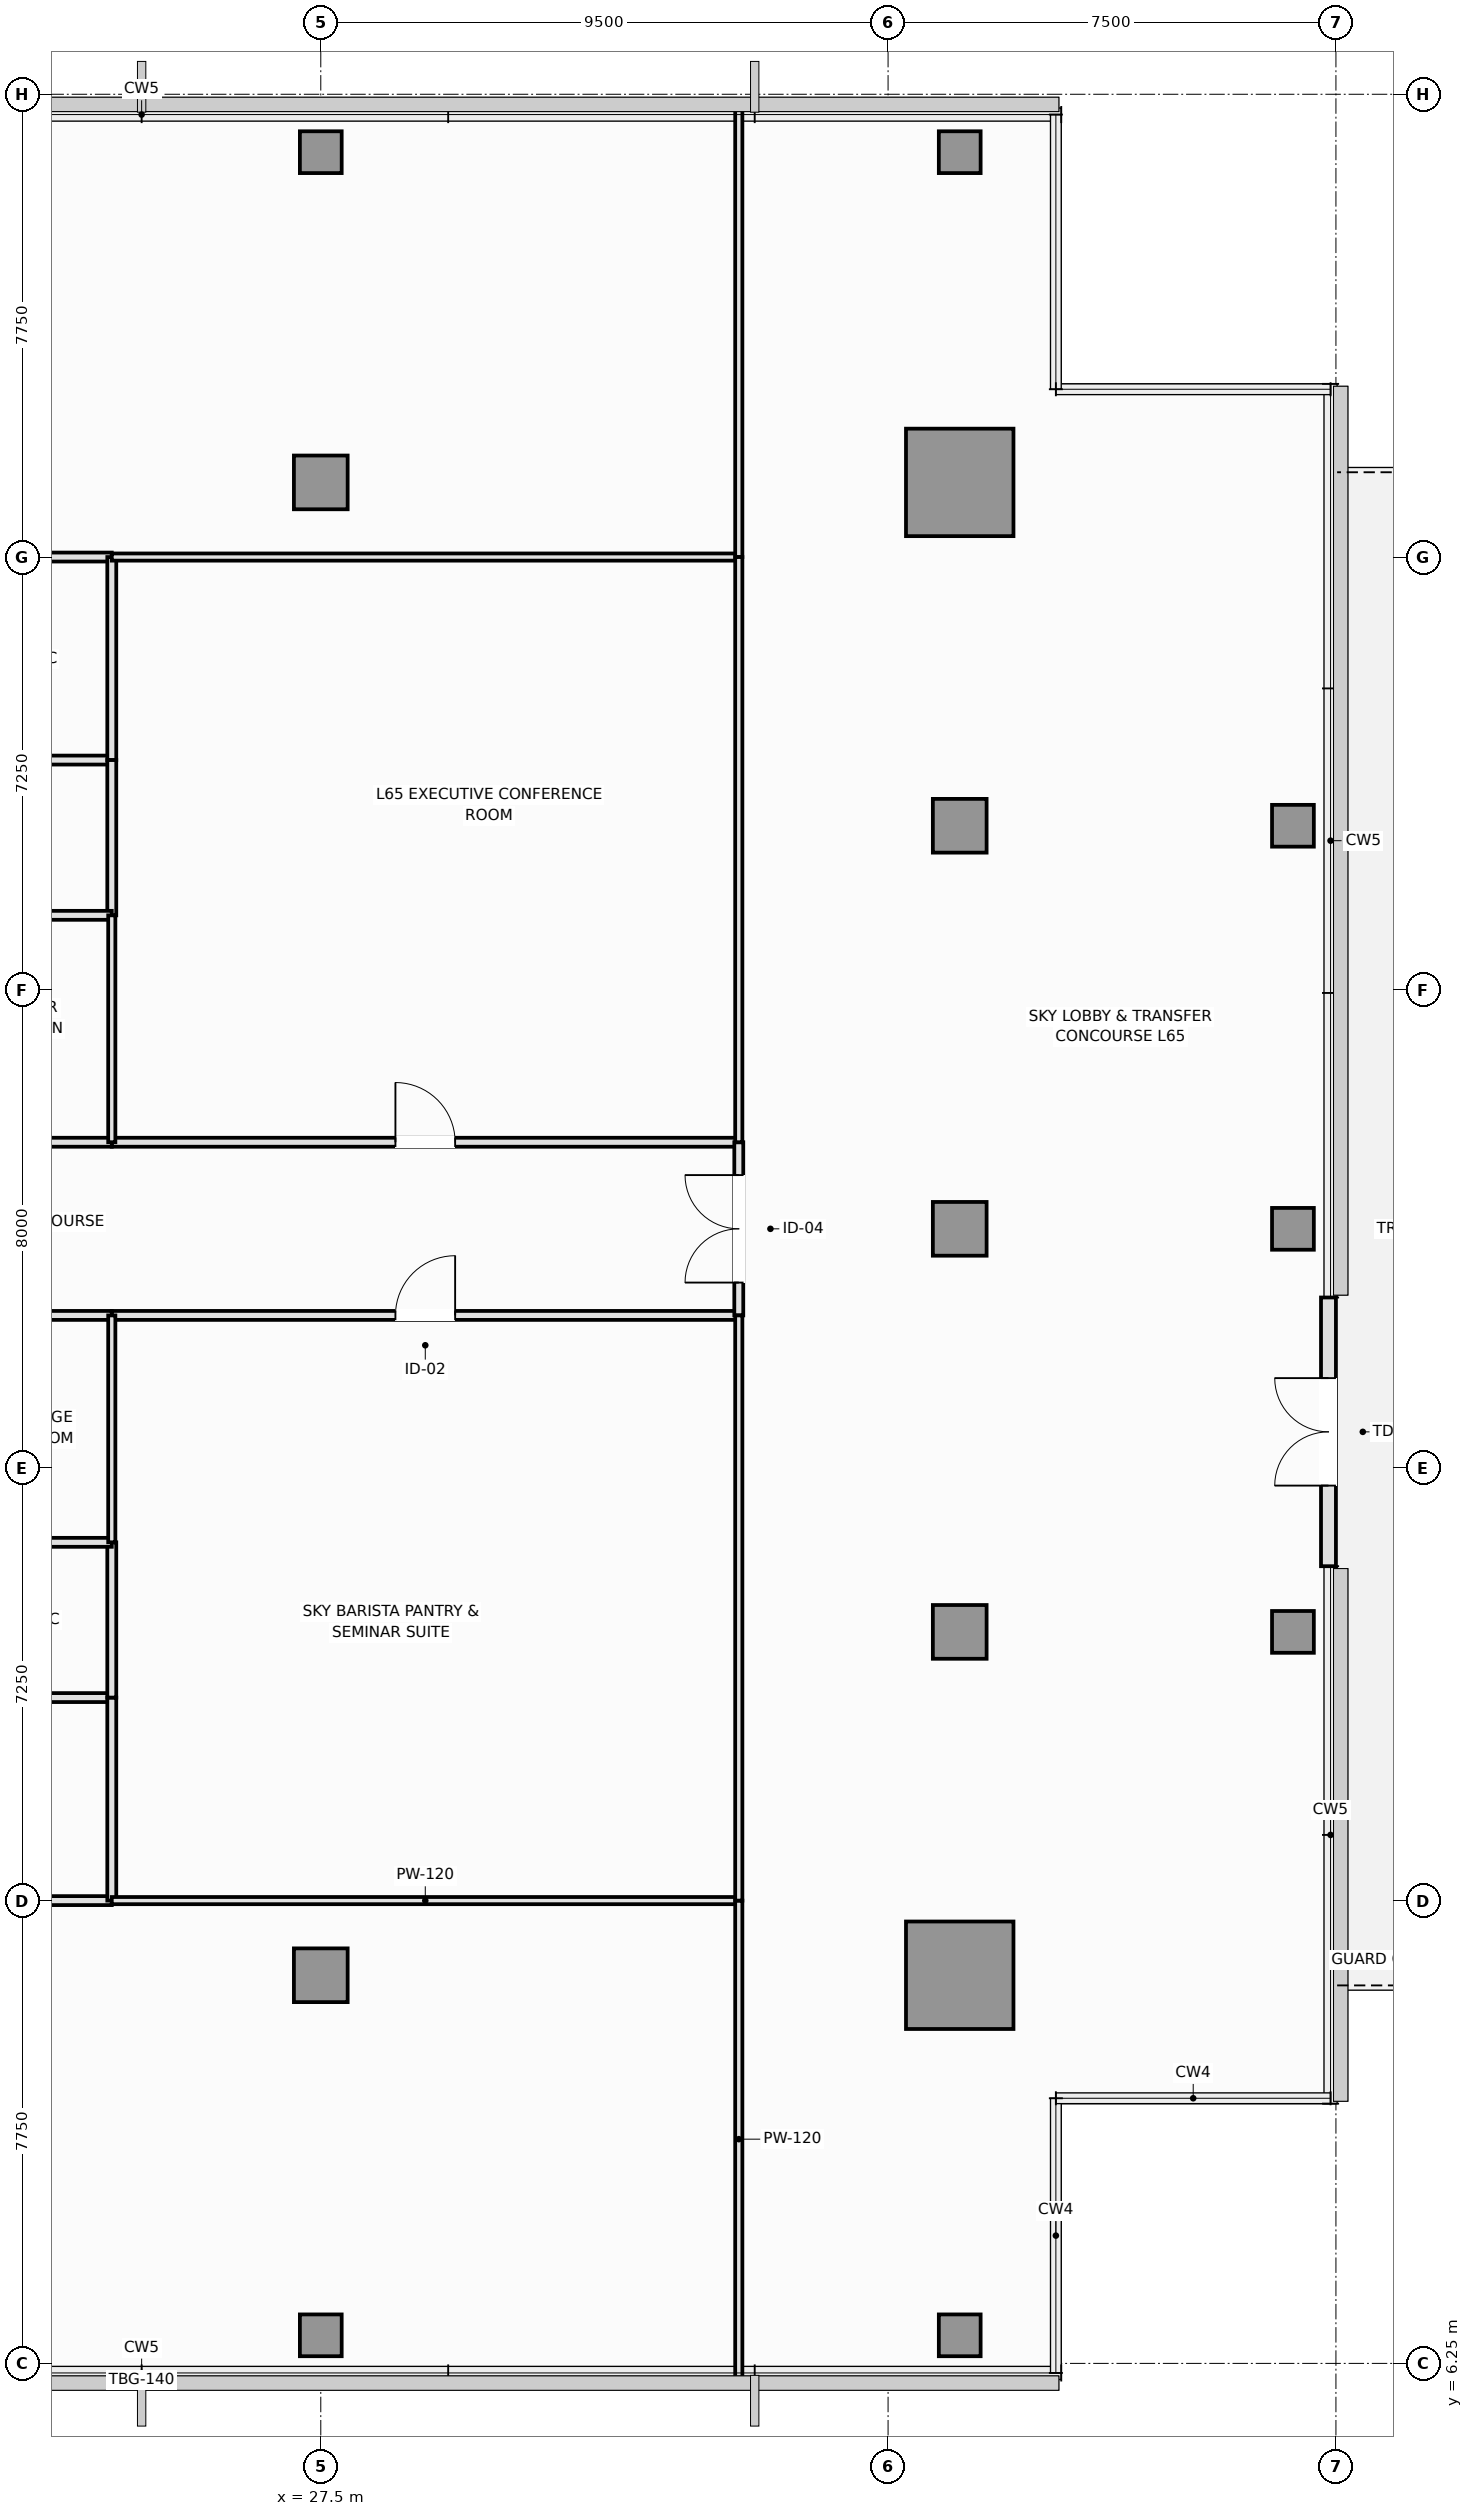
"""IFC4 building model, lengths in metres.
Left out: names, types, materials, properties, quantities, classifications, styles, units other than length and angle.
Written with IfcOpenShell. Run it as: python <this file> out.ifc"""

import sys

from ifc_helpers import new_model, si_unit, direction, frame, frame_2d, origin, origin_2d, place, context, subcontext, project, spatial, rectangle, extrude, element, fill, save


model = new_model("IFC4")
c1 = context("Model", 3, precision=1e-05, world=origin(), true_north=direction((0.0, 1.0)))
c2 = subcontext(c1, "Body", "Model", "MODEL_VIEW")
j1 = project(units=[si_unit("LENGTHUNIT", "METRE"), si_unit("PLANEANGLEUNIT", "RADIAN")], contexts=[c1])
p1 = place(None, origin())
s1 = spatial("IfcSite", under=j1, at=p1, CompositionType="ELEMENT")
p2 = place(p1, origin())
s2 = spatial("IfcBuilding", under=s1, at=p2, CompositionType="ELEMENT")
p3 = place(p2, frame((0.0, 0.0, 244.85)))
s3 = spatial("IfcBuildingStorey", under=s2, at=p3, CompositionType="ELEMENT", Elevation=244.85)
for number, where, z_axis, x_axis in (
    (1, (38.2, 12.75, 0.0), (0.0, 0.0, 1.0), (1.0, 0.0, 0.0)),
    (2, (38.2, 37.75, 0.0), (0.0, 0.0, 1.0), (1.0, 0.0, 0.0)),
):
    element("IfcColumn", number, at=place(p3, frame(where, z_axis=z_axis, x_axis=x_axis)), inside=s3, PredefinedType="COLUMN", context=c2, shape_type="SweptSolid", body=[
        extrude(rectangle(XDim=1.8, YDim=1.8, at=origin_2d()), origin(), (0.0, 0.0, 1.0), 4.4),
    ])
for number, where, z_axis, x_axis in (
    (3, (27.5, 12.75, 0.0), (0.0, 0.0, 1.0), (1.0, 0.0, 0.0)),
    (4, (27.5, 37.75, 0.0), (0.0, 0.0, 1.0), (1.0, 0.0, 0.0)),
    (5, (38.2, 18.5, 0.0), (0.0, 0.0, 1.0), (1.0, 0.0, 0.0)),
    (6, (38.2, 25.25, 0.0), (0.0, 0.0, 1.0), (1.0, 0.0, 0.0)),
    (7, (38.2, 32.0, 0.0), (0.0, 0.0, 1.0), (1.0, 0.0, 0.0)),
):
    element("IfcColumn", number, at=place(p3, frame(where, z_axis=z_axis, x_axis=x_axis)), inside=s3, PredefinedType="COLUMN", context=c2, shape_type="SweptSolid", body=[
        extrude(rectangle(XDim=0.9, YDim=0.9, at=origin_2d()), origin(), (0.0, 0.0, 1.0), 4.4),
    ])
for number, where, z_axis, x_axis in (
    (8, (43.78, 18.5, 0.0), (0.0, 0.0, 1.0), (1.0, 0.0, 0.0)),
    (9, (43.78, 25.25, 0.0), (0.0, 0.0, 1.0), (1.0, 0.0, 0.0)),
    (10, (43.78, 32.0, 0.0), (0.0, 0.0, 1.0), (1.0, 0.0, 0.0)),
    (11, (27.5, 6.72, 0.0), (0.0, 0.0, 1.0), (1.0, 0.0, 0.0)),
    (12, (38.2, 6.72, 0.0), (0.0, 0.0, 1.0), (1.0, 0.0, 0.0)),
    (13, (27.5, 43.28, 0.0), (0.0, 0.0, 1.0), (1.0, 0.0, 0.0)),
    (14, (38.2, 43.28, 0.0), (0.0, 0.0, 1.0), (1.0, 0.0, 0.0)),
):
    element("IfcColumn", number, at=place(p3, frame(where, z_axis=z_axis, x_axis=x_axis)), inside=s3, PredefinedType="COLUMN", context=c2, shape_type="SweptSolid", body=[
        extrude(rectangle(XDim=0.7, YDim=0.7, at=origin_2d()), origin(), (0.0, 0.0, 1.0), 4.4),
    ])
p4 = place(p3, frame((44.375, 19.6, 0.0), z_axis=(0.0, 0.0, 1.0), x_axis=(0.0, 1.0, 0.0)))
e15 = element("IfcWall", 15, at=p4, inside=s3, PredefinedType="SOLIDWALL", context=c2, shape_type="SweptSolid", body=[
    extrude(rectangle(XDim=4.5, YDim=0.25, at=frame_2d((2.25, 0.0))), origin(), (0.0, 0.0, 1.0), 4.24),
])
p5 = place(p4, frame((1.35, 0.0, 0.0)))
e16 = element("IfcOpeningElement", 16, at=p5, cuts=e15, PredefinedType="OPENING", context=c2, shape_type="SweptSolid", body=[
    extrude(rectangle(XDim=1.8, YDim=2.2, at=frame_2d((0.9, 1.1))), frame((0.0, 0.135, 0.0), z_axis=(0.0, -1.0, 0.0), x_axis=(1.0, 0.0, 0.0)), (0.0, 0.0, 1.0), 0.27),
])
p6 = place(p3, frame((24.0, 23.8, 0.0), z_axis=(0.0, 0.0, 1.0), x_axis=(1.0, 0.0, 0.0)))
e17 = element("IfcWall", 17, at=p6, inside=s3, PredefinedType="PARTITIONING", context=c2, shape_type="SweptSolid", body=[
    extrude(rectangle(XDim=10.5, YDim=0.15, at=frame_2d((5.25, 0.0))), origin(), (0.0, 0.0, 1.0), 4.24),
])
p7 = place(p6, frame((4.75, 0.0, 0.0)))
e18 = element("IfcOpeningElement", 18, at=p7, cuts=e17, PredefinedType="OPENING", context=c2, shape_type="SweptSolid", body=[
    extrude(rectangle(XDim=1.0, YDim=2.15, at=frame_2d((0.5, 1.075))), frame((0.0, 0.085, 0.0), z_axis=(0.0, -1.0, 0.0), x_axis=(1.0, 0.0, 0.0)), (0.0, 0.0, 1.0), 0.17),
])
p8 = place(p3, frame((24.0, 26.7, 0.0), z_axis=(0.0, 0.0, 1.0), x_axis=(1.0, 0.0, 0.0)))
e19 = element("IfcWall", 19, at=p8, inside=s3, PredefinedType="PARTITIONING", context=c2, shape_type="SweptSolid", body=[
    extrude(rectangle(XDim=10.5, YDim=0.15, at=frame_2d((5.25, 0.0))), origin(), (0.0, 0.0, 1.0), 4.24),
])
p9 = place(p8, frame((4.75, 0.0, 0.0)))
e20 = element("IfcOpeningElement", 20, at=p9, cuts=e19, PredefinedType="OPENING", context=c2, shape_type="SweptSolid", body=[
    extrude(rectangle(XDim=1.0, YDim=2.15, at=frame_2d((0.5, 1.075))), frame((0.0, 0.085, 0.0), z_axis=(0.0, -1.0, 0.0), x_axis=(1.0, 0.0, 0.0)), (0.0, 0.0, 1.0), 0.17),
])
p10 = place(p3, frame((34.5, 23.8, 0.0), z_axis=(0.0, 0.0, 1.0), x_axis=(0.0, 1.0, 0.0)))
e21 = element("IfcWall", 21, at=p10, inside=s3, PredefinedType="PARTITIONING", context=c2, shape_type="SweptSolid", body=[
    extrude(rectangle(XDim=2.9, YDim=0.15, at=frame_2d((1.45, 0.0))), origin(), (0.0, 0.0, 1.0), 4.24),
])
p11 = place(p10, frame((0.55, 0.0, 0.0)))
e22 = element("IfcOpeningElement", 22, at=p11, cuts=e21, PredefinedType="OPENING", context=c2, shape_type="SweptSolid", body=[
    extrude(rectangle(XDim=1.8, YDim=2.2, at=frame_2d((0.9, 1.1))), frame((0.0, 0.085, 0.0), z_axis=(0.0, -1.0, 0.0), x_axis=(1.0, 0.0, 0.0)), (0.0, 0.0, 1.0), 0.17),
])
for number, where, z_axis, x_axis in (
    (23, (20.2, 23.8, 0.0), (0.0, 0.0, 1.0), (1.0, 0.0, 0.0)),
    (24, (20.2, 26.7, 0.0), (0.0, 0.0, 1.0), (1.0, 0.0, 0.0)),
):
    element("IfcWall", number, at=place(p3, frame(where, z_axis=z_axis, x_axis=x_axis)), inside=s3, PredefinedType="PARTITIONING", context=c2, shape_type="SweptSolid", body=[
        extrude(rectangle(XDim=3.8, YDim=0.15, at=frame_2d((1.9, 0.0))), origin(), (0.0, 0.0, 1.0), 4.24),
    ])
for number, where, z_axis, x_axis in (
    (25, (20.2, 17.4, 0.0), (0.0, 0.0, 1.0), (1.0, 0.0, 0.0)),
    (26, (20.2, 14.0, 0.0), (0.0, 0.0, 1.0), (1.0, 0.0, 0.0)),
):
    element("IfcWall", number, at=place(p3, frame(where, z_axis=z_axis, x_axis=x_axis)), inside=s3, PredefinedType="PLUMBINGWALL", context=c2, shape_type="SweptSolid", body=[
        extrude(rectangle(XDim=3.8, YDim=0.15, at=frame_2d((1.9, 0.0))), origin(), (0.0, 0.0, 1.0), 4.24),
    ])
p12 = place(p3, frame((24.0, 14.0, 0.0), z_axis=(0.0, 0.0, 1.0), x_axis=(0.0, 1.0, 0.0)))
e27 = element("IfcWall", 27, at=p12, inside=s3, PredefinedType="PLUMBINGWALL", context=c2, shape_type="SweptSolid", body=[
    extrude(rectangle(XDim=3.4, YDim=0.15, at=frame_2d((1.7, 0.0))), origin(), (0.0, 0.0, 1.0), 4.24),
])
for number, where, z_axis, x_axis in (
    (28, (20.2, 33.1, 0.0), (0.0, 0.0, 1.0), (1.0, 0.0, 0.0)),
    (29, (20.2, 36.5, 0.0), (0.0, 0.0, 1.0), (1.0, 0.0, 0.0)),
):
    element("IfcWall", number, at=place(p3, frame(where, z_axis=z_axis, x_axis=x_axis)), inside=s3, PredefinedType="PLUMBINGWALL", context=c2, shape_type="SweptSolid", body=[
        extrude(rectangle(XDim=3.8, YDim=0.15, at=frame_2d((1.9, 0.0))), origin(), (0.0, 0.0, 1.0), 4.24),
    ])
p13 = place(p3, frame((24.0, 33.1, 0.0), z_axis=(0.0, 0.0, 1.0), x_axis=(0.0, 1.0, 0.0)))
e30 = element("IfcWall", 30, at=p13, inside=s3, PredefinedType="PLUMBINGWALL", context=c2, shape_type="SweptSolid", body=[
    extrude(rectangle(XDim=3.4, YDim=0.15, at=frame_2d((1.7, 0.0))), origin(), (0.0, 0.0, 1.0), 4.24),
])
p14 = place(p3, frame((24.0, 17.4, 0.0), z_axis=(0.0, 0.0, 1.0), x_axis=(0.0, 1.0, 0.0)))
e31 = element("IfcWall", 31, at=p14, inside=s3, PredefinedType="PLUMBINGWALL", context=c2, shape_type="SweptSolid", body=[
    extrude(rectangle(XDim=2.6, YDim=0.15, at=frame_2d((1.3, 0.0))), origin(), (0.0, 0.0, 1.0), 4.24),
])
p15 = place(p3, frame((20.2, 20.0, 0.0), z_axis=(0.0, 0.0, 1.0), x_axis=(1.0, 0.0, 0.0)))
e32 = element("IfcWall", 32, at=p15, inside=s3, PredefinedType="PLUMBINGWALL", context=c2, shape_type="SweptSolid", body=[
    extrude(rectangle(XDim=3.8, YDim=0.15, at=frame_2d((1.9, 0.0))), origin(), (0.0, 0.0, 1.0), 4.24),
])
p16 = place(p3, frame((24.0, 30.5, 0.0), z_axis=(0.0, 0.0, 1.0), x_axis=(0.0, 1.0, 0.0)))
e33 = element("IfcWall", 33, at=p16, inside=s3, PredefinedType="PLUMBINGWALL", context=c2, shape_type="SweptSolid", body=[
    extrude(rectangle(XDim=2.6, YDim=0.15, at=frame_2d((1.3, 0.0))), origin(), (0.0, 0.0, 1.0), 4.24),
])
p17 = place(p3, frame((20.2, 30.5, 0.0), z_axis=(0.0, 0.0, 1.0), x_axis=(1.0, 0.0, 0.0)))
e34 = element("IfcWall", 34, at=p17, inside=s3, PredefinedType="PLUMBINGWALL", context=c2, shape_type="SweptSolid", body=[
    extrude(rectangle(XDim=3.8, YDim=0.15, at=frame_2d((1.9, 0.0))), origin(), (0.0, 0.0, 1.0), 4.24),
])
p18 = place(p3, frame((24.0, 14.0, 0.0), z_axis=(0.0, 0.0, 1.0), x_axis=(1.0, 0.0, 0.0)))
e35 = element("IfcWall", 35, at=p18, inside=s3, PredefinedType="PARTITIONING", context=c2, shape_type="SweptSolid", body=[
    extrude(rectangle(XDim=10.5, YDim=0.12, at=frame_2d((5.25, 0.0))), origin(), (0.0, 0.0, 1.0), 4.24),
])
p19 = place(p3, frame((34.5, 6.01, 0.0), z_axis=(0.0, 0.0, 1.0), x_axis=(0.0, 1.0, 0.0)))
e36 = element("IfcWall", 36, at=p19, inside=s3, PredefinedType="PARTITIONING", context=c2, shape_type="SweptSolid", body=[
    extrude(rectangle(XDim=7.99, YDim=0.12, at=frame_2d((3.995, 0.0))), origin(), (0.0, 0.0, 1.0), 3.91),
])
p20 = place(p3, frame((24.0, 36.5, 0.0), z_axis=(0.0, 0.0, 1.0), x_axis=(1.0, 0.0, 0.0)))
e37 = element("IfcWall", 37, at=p20, inside=s3, PredefinedType="PARTITIONING", context=c2, shape_type="SweptSolid", body=[
    extrude(rectangle(XDim=10.5, YDim=0.12, at=frame_2d((5.25, 0.0))), origin(), (0.0, 0.0, 1.0), 4.24),
])
p21 = place(p3, frame((34.5, 36.5, 0.0), z_axis=(0.0, 0.0, 1.0), x_axis=(0.0, 1.0, 0.0)))
e38 = element("IfcWall", 38, at=p21, inside=s3, PredefinedType="PARTITIONING", context=c2, shape_type="SweptSolid", body=[
    extrude(rectangle(XDim=7.49, YDim=0.12, at=frame_2d((3.745, 0.0))), origin(), (0.0, 0.0, 1.0), 3.91),
])
p22 = place(p3, frame((34.5, 14.0, 0.0), z_axis=(0.0, 0.0, 1.0), x_axis=(0.0, 1.0, 0.0)))
e39 = element("IfcWall", 39, at=p22, inside=s3, PredefinedType="PARTITIONING", context=c2, shape_type="SweptSolid", body=[
    extrude(rectangle(XDim=9.8, YDim=0.12, at=frame_2d((4.9, 0.0))), origin(), (0.0, 0.0, 1.0), 4.24),
])
p23 = place(p3, frame((24.0, 20.0, 0.0), z_axis=(0.0, 0.0, 1.0), x_axis=(0.0, 1.0, 0.0)))
e40 = element("IfcWall", 40, at=p23, inside=s3, PredefinedType="PARTITIONING", context=c2, shape_type="SweptSolid", body=[
    extrude(rectangle(XDim=3.8, YDim=0.12, at=frame_2d((1.9, 0.0))), origin(), (0.0, 0.0, 1.0), 4.24),
])
p24 = place(p3, frame((34.5, 26.7, 0.0), z_axis=(0.0, 0.0, 1.0), x_axis=(0.0, 1.0, 0.0)))
e41 = element("IfcWall", 41, at=p24, inside=s3, PredefinedType="PARTITIONING", context=c2, shape_type="SweptSolid", body=[
    extrude(rectangle(XDim=9.8, YDim=0.12, at=frame_2d((4.9, 0.0))), origin(), (0.0, 0.0, 1.0), 4.24),
])
p25 = place(p3, frame((24.0, 26.7, 0.0), z_axis=(0.0, 0.0, 1.0), x_axis=(0.0, 1.0, 0.0)))
e42 = element("IfcWall", 42, at=p25, inside=s3, PredefinedType="PARTITIONING", context=c2, shape_type="SweptSolid", body=[
    extrude(rectangle(XDim=3.8, YDim=0.12, at=frame_2d((1.9, 0.0))), origin(), (0.0, 0.0, 1.0), 4.24),
])
p26 = place(p5, frame((1.8, 0.0, 0.0), z_axis=(0.0, 0.0, 1.0), x_axis=(-1.0, 0.0, 0.0)))
e43 = element("IfcDoor", 43, at=p26, inside=s3, OperationType="DOUBLE_DOOR_SINGLE_SWING", PredefinedType="DOOR", context=c2, shape_type="SweptSolid", body=[
    extrude(rectangle(XDim=1.8, YDim=2.2, at=frame_2d((0.9, 1.1))), frame((0.0, 0.025, 0.0), z_axis=(0.0, -1.0, 0.0), x_axis=(1.0, 0.0, 0.0)), (0.0, 0.0, 1.0), 0.05),
])
fill(e16, e43)
p27 = place(p7, origin())
e44 = element("IfcDoor", 44, at=p27, inside=s3, OperationType="SINGLE_SWING_RIGHT", PredefinedType="DOOR", context=c2, shape_type="SweptSolid", body=[
    extrude(rectangle(XDim=1.0, YDim=2.15, at=frame_2d((0.5, 1.075))), frame((0.0, 0.025, 0.0), z_axis=(0.0, -1.0, 0.0), x_axis=(1.0, 0.0, 0.0)), (0.0, 0.0, 1.0), 0.05),
])
fill(e18, e44)
p28 = place(p9, origin())
e45 = element("IfcDoor", 45, at=p28, inside=s3, OperationType="SINGLE_SWING_LEFT", PredefinedType="DOOR", context=c2, shape_type="SweptSolid", body=[
    extrude(rectangle(XDim=1.0, YDim=2.15, at=frame_2d((0.5, 1.075))), frame((0.0, 0.025, 0.0), z_axis=(0.0, -1.0, 0.0), x_axis=(1.0, 0.0, 0.0)), (0.0, 0.0, 1.0), 0.05),
])
fill(e20, e45)
p29 = place(p11, origin())
e46 = element("IfcDoor", 46, at=p29, inside=s3, OperationType="DOUBLE_DOOR_SINGLE_SWING", PredefinedType="DOOR", context=c2, shape_type="SweptSolid", body=[
    extrude(rectangle(XDim=1.8, YDim=2.2, at=frame_2d((0.9, 1.1))), frame((0.0, 0.025, 0.0), z_axis=(0.0, -1.0, 0.0), x_axis=(1.0, 0.0, 0.0)), (0.0, 0.0, 1.0), 0.05),
])
fill(e22, e46)
save(model, sys.argv[1])
